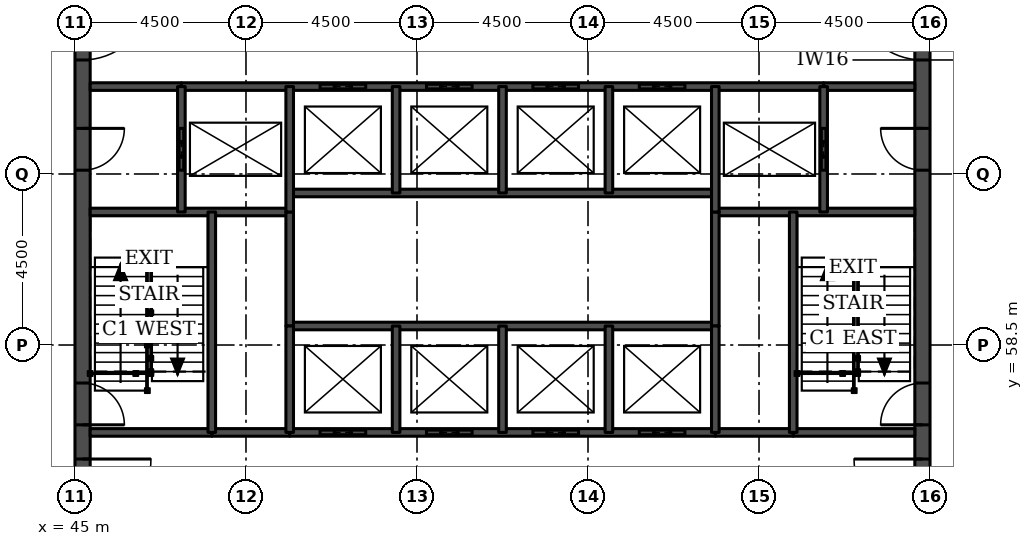
"""IFC4 building model, lengths in metres.
Left out: names, types, materials, properties, quantities, classifications, styles, units other than length and angle.
Written with IfcOpenShell. Run it as: python <this file> out.ifc"""

import sys

from ifc_helpers import new_model, si_unit, direction, frame, frame_2d, origin, place, context, subcontext, project, spatial, rectangle, extrude, element, fill, save


model = new_model("IFC4")
c1 = context("Model", 3, precision=1e-05, world=origin(), true_north=direction((0.0, 1.0)))
c2 = subcontext(c1, "Body", "Model", "MODEL_VIEW")
j1 = project(units=[si_unit("LENGTHUNIT", "METRE"), si_unit("PLANEANGLEUNIT", "RADIAN")], contexts=[c1])
p1 = place(None, origin())
s1 = spatial("IfcSite", under=j1, at=p1, CompositionType="ELEMENT")
p2 = place(p1, origin())
s2 = spatial("IfcBuilding", under=s1, at=p2, CompositionType="ELEMENT")
p3 = place(p2, frame((0.0, 0.0, 188.4)))
s3 = spatial("IfcBuildingStorey", under=s2, at=p3, CompositionType="ELEMENT", Elevation=188.4)
p4 = place(p3, frame((45.2, 49.5, 0.0), z_axis=(0.0, 0.0, 1.0), x_axis=(0.0, 1.0, 0.0)))
e1 = element("IfcWall", 1, at=p4, inside=s3, PredefinedType="SHEAR", context=c2, shape_type="SweptSolid", body=[
    extrude(rectangle(XDim=22.5, YDim=0.4, at=frame_2d((11.25, 0.0))), origin(), (0.0, 0.0, 1.0), 3.7),
])
p5 = place(p4, frame((4.2, 0.0, 0.0)))
e2 = element("IfcOpeningElement", 2, at=p5, cuts=e1, PredefinedType="OPENING", context=c2, shape_type="SweptSolid", body=[
    extrude(rectangle(XDim=1.8, YDim=2.1, at=frame_2d((0.9, 1.05))), frame((0.0, 0.21, 0.0), z_axis=(0.0, -1.0, 0.0), x_axis=(1.0, 0.0, 0.0)), (0.0, 0.0, 1.0), 0.42),
])
p6 = place(p4, frame((6.9, 0.0, 0.0)))
e3 = element("IfcOpeningElement", 3, at=p6, cuts=e1, PredefinedType="OPENING", context=c2, shape_type="SweptSolid", body=[
    extrude(rectangle(XDim=1.1, YDim=2.1, at=frame_2d((0.55, 1.05))), frame((0.0, 0.21, 0.0), z_axis=(0.0, -1.0, 0.0), x_axis=(1.0, 0.0, 0.0)), (0.0, 0.0, 1.0), 0.42),
])
p7 = place(p4, frame((13.6, 0.0, 0.0)))
e4 = element("IfcOpeningElement", 4, at=p7, cuts=e1, PredefinedType="OPENING", context=c2, shape_type="SweptSolid", body=[
    extrude(rectangle(XDim=1.1, YDim=2.1, at=frame_2d((0.55, 1.05))), frame((0.0, 0.21, 0.0), z_axis=(0.0, -1.0, 0.0), x_axis=(1.0, 0.0, 0.0)), (0.0, 0.0, 1.0), 0.42),
])
p8 = place(p4, frame((16.5, 0.0, 0.0)))
e5 = element("IfcOpeningElement", 5, at=p8, cuts=e1, PredefinedType="OPENING", context=c2, shape_type="SweptSolid", body=[
    extrude(rectangle(XDim=1.8, YDim=2.1, at=frame_2d((0.9, 1.05))), frame((0.0, 0.21, 0.0), z_axis=(0.0, -1.0, 0.0), x_axis=(1.0, 0.0, 0.0)), (0.0, 0.0, 1.0), 0.42),
])
p9 = place(p3, frame((67.3, 49.5, 0.0), z_axis=(0.0, 0.0, 1.0), x_axis=(0.0, 1.0, 0.0)))
e6 = element("IfcWall", 6, at=p9, inside=s3, PredefinedType="SHEAR", context=c2, shape_type="SweptSolid", body=[
    extrude(rectangle(XDim=22.5, YDim=0.4, at=frame_2d((11.25, 0.0))), origin(), (0.0, 0.0, 1.0), 3.7),
])
p10 = place(p9, frame((4.2, 0.0, 0.0)))
e7 = element("IfcOpeningElement", 7, at=p10, cuts=e6, PredefinedType="OPENING", context=c2, shape_type="SweptSolid", body=[
    extrude(rectangle(XDim=1.8, YDim=2.1, at=frame_2d((0.9, 1.05))), frame((0.0, 0.21, 0.0), z_axis=(0.0, -1.0, 0.0), x_axis=(1.0, 0.0, 0.0)), (0.0, 0.0, 1.0), 0.42),
])
p11 = place(p9, frame((6.9, 0.0, 0.0)))
e8 = element("IfcOpeningElement", 8, at=p11, cuts=e6, PredefinedType="OPENING", context=c2, shape_type="SweptSolid", body=[
    extrude(rectangle(XDim=1.1, YDim=2.1, at=frame_2d((0.55, 1.05))), frame((0.0, 0.21, 0.0), z_axis=(0.0, -1.0, 0.0), x_axis=(1.0, 0.0, 0.0)), (0.0, 0.0, 1.0), 0.42),
])
p12 = place(p9, frame((13.6, 0.0, 0.0)))
e9 = element("IfcOpeningElement", 9, at=p12, cuts=e6, PredefinedType="OPENING", context=c2, shape_type="SweptSolid", body=[
    extrude(rectangle(XDim=1.1, YDim=2.1, at=frame_2d((0.55, 1.05))), frame((0.0, 0.21, 0.0), z_axis=(0.0, -1.0, 0.0), x_axis=(1.0, 0.0, 0.0)), (0.0, 0.0, 1.0), 0.42),
])
p13 = place(p9, frame((16.5, 0.0, 0.0)))
e10 = element("IfcOpeningElement", 10, at=p13, cuts=e6, PredefinedType="OPENING", context=c2, shape_type="SweptSolid", body=[
    extrude(rectangle(XDim=1.8, YDim=2.1, at=frame_2d((0.9, 1.05))), frame((0.0, 0.21, 0.0), z_axis=(0.0, -1.0, 0.0), x_axis=(1.0, 0.0, 0.0)), (0.0, 0.0, 1.0), 0.42),
])
for number, where, z_axis, x_axis in (
    (11, (48.6, 56.2, 0.0), (0.0, 0.0, 1.0), (1.0, 0.0, 0.0)),
    (12, (61.85, 56.2, 0.0), (0.0, 0.0, 1.0), (1.0, 0.0, 0.0)),
):
    element("IfcWall", number, at=place(p3, frame(where, z_axis=z_axis, x_axis=x_axis)), inside=s3, PredefinedType="SOLIDWALL", context=c2, shape_type="SweptSolid", body=[
        extrude(rectangle(XDim=2.05, YDim=0.2, at=frame_2d((1.025, 0.0))), origin(), (0.0, 0.0, 1.0), 3.55),
    ])
p14 = place(p3, frame((45.4, 56.2, 0.0), z_axis=(0.0, 0.0, 1.0), x_axis=(1.0, 0.0, 0.0)))
e13 = element("IfcWall", 13, at=p14, inside=s3, PredefinedType="SOLIDWALL", context=c2, shape_type="SweptSolid", body=[
    extrude(rectangle(XDim=3.2, YDim=0.2, at=frame_2d((1.6, 0.0))), origin(), (0.0, 0.0, 1.0), 3.55),
])
p15 = place(p3, frame((50.65, 56.2, 0.0), z_axis=(0.0, 0.0, 1.0), x_axis=(1.0, 0.0, 0.0)))
e14 = element("IfcWall", 14, at=p15, inside=s3, PredefinedType="SOLIDWALL", context=c2, shape_type="SweptSolid", body=[
    extrude(rectangle(XDim=11.2, YDim=0.2, at=frame_2d((5.6, 0.0))), origin(), (0.0, 0.0, 1.0), 3.55),
])
p16 = place(p15, frame((0.8, 0.0, 0.0)))
e15 = element("IfcOpeningElement", 15, at=p16, cuts=e14, PredefinedType="OPENING", context=c2, shape_type="SweptSolid", body=[
    extrude(rectangle(XDim=1.2, YDim=2.1, at=frame_2d((0.6, 1.05))), frame((0.0, 0.11, 0.0), z_axis=(0.0, -1.0, 0.0), x_axis=(1.0, 0.0, 0.0)), (0.0, 0.0, 1.0), 0.22),
])
p17 = place(p15, frame((3.6, 0.0, 0.0)))
e16 = element("IfcOpeningElement", 16, at=p17, cuts=e14, PredefinedType="OPENING", context=c2, shape_type="SweptSolid", body=[
    extrude(rectangle(XDim=1.2, YDim=2.1, at=frame_2d((0.6, 1.05))), frame((0.0, 0.11, 0.0), z_axis=(0.0, -1.0, 0.0), x_axis=(1.0, 0.0, 0.0)), (0.0, 0.0, 1.0), 0.22),
])
p18 = place(p15, frame((6.4, 0.0, 0.0)))
e17 = element("IfcOpeningElement", 17, at=p18, cuts=e14, PredefinedType="OPENING", context=c2, shape_type="SweptSolid", body=[
    extrude(rectangle(XDim=1.2, YDim=2.1, at=frame_2d((0.6, 1.05))), frame((0.0, 0.11, 0.0), z_axis=(0.0, -1.0, 0.0), x_axis=(1.0, 0.0, 0.0)), (0.0, 0.0, 1.0), 0.22),
])
p19 = place(p15, frame((9.2, 0.0, 0.0)))
e18 = element("IfcOpeningElement", 18, at=p19, cuts=e14, PredefinedType="OPENING", context=c2, shape_type="SweptSolid", body=[
    extrude(rectangle(XDim=1.2, YDim=2.1, at=frame_2d((0.6, 1.05))), frame((0.0, 0.11, 0.0), z_axis=(0.0, -1.0, 0.0), x_axis=(1.0, 0.0, 0.0)), (0.0, 0.0, 1.0), 0.22),
])
p20 = place(p3, frame((63.9, 56.2, 0.0), z_axis=(0.0, 0.0, 1.0), x_axis=(1.0, 0.0, 0.0)))
e19 = element("IfcWall", 19, at=p20, inside=s3, PredefinedType="SOLIDWALL", context=c2, shape_type="SweptSolid", body=[
    extrude(rectangle(XDim=3.2, YDim=0.2, at=frame_2d((1.6, 0.0))), origin(), (0.0, 0.0, 1.0), 3.55),
])
p21 = place(p3, frame((50.65, 59.0, 0.0), z_axis=(0.0, 0.0, 1.0), x_axis=(1.0, 0.0, 0.0)))
e20 = element("IfcWall", 20, at=p21, inside=s3, PredefinedType="SOLIDWALL", context=c2, shape_type="SweptSolid", body=[
    extrude(rectangle(XDim=11.2, YDim=0.2, at=frame_2d((5.6, 0.0))), origin(), (0.0, 0.0, 1.0), 3.7),
])
for number, where, z_axis, x_axis in (
    (21, (45.4, 62.0, 0.0), (0.0, 0.0, 1.0), (1.0, 0.0, 0.0)),
    (22, (61.85, 62.0, 0.0), (0.0, 0.0, 1.0), (1.0, 0.0, 0.0)),
):
    element("IfcWall", number, at=place(p3, frame(where, z_axis=z_axis, x_axis=x_axis)), inside=s3, PredefinedType="SOLIDWALL", context=c2, shape_type="SweptSolid", body=[
        extrude(rectangle(XDim=5.25, YDim=0.2, at=frame_2d((2.625, 0.0))), origin(), (0.0, 0.0, 1.0), 3.55),
    ])
p22 = place(p3, frame((50.65, 62.5, 0.0), z_axis=(0.0, 0.0, 1.0), x_axis=(1.0, 0.0, 0.0)))
e23 = element("IfcWall", 23, at=p22, inside=s3, PredefinedType="SOLIDWALL", context=c2, shape_type="SweptSolid", body=[
    extrude(rectangle(XDim=11.2, YDim=0.2, at=frame_2d((5.6, 0.0))), origin(), (0.0, 0.0, 1.0), 3.7),
])
for number, where, z_axis, x_axis in (
    (24, (45.4, 65.3, 0.0), (0.0, 0.0, 1.0), (1.0, 0.0, 0.0)),
    (25, (64.7, 65.3, 0.0), (0.0, 0.0, 1.0), (1.0, 0.0, 0.0)),
):
    element("IfcWall", number, at=place(p3, frame(where, z_axis=z_axis, x_axis=x_axis)), inside=s3, PredefinedType="SOLIDWALL", context=c2, shape_type="SweptSolid", body=[
        extrude(rectangle(XDim=2.4, YDim=0.2, at=frame_2d((1.2, 0.0))), origin(), (0.0, 0.0, 1.0), 3.55),
    ])
p23 = place(p3, frame((47.8, 65.3, 0.0), z_axis=(0.0, 0.0, 1.0), x_axis=(1.0, 0.0, 0.0)))
e26 = element("IfcWall", 26, at=p23, inside=s3, PredefinedType="SOLIDWALL", context=c2, shape_type="SweptSolid", body=[
    extrude(rectangle(XDim=16.9, YDim=0.2, at=frame_2d((8.45, 0.0))), origin(), (0.0, 0.0, 1.0), 3.55),
])
p24 = place(p23, frame((3.65, 0.0, 0.0)))
e27 = element("IfcOpeningElement", 27, at=p24, cuts=e26, PredefinedType="OPENING", context=c2, shape_type="SweptSolid", body=[
    extrude(rectangle(XDim=1.2, YDim=2.1, at=frame_2d((0.6, 1.05))), frame((0.0, 0.11, 0.0), z_axis=(0.0, -1.0, 0.0), x_axis=(1.0, 0.0, 0.0)), (0.0, 0.0, 1.0), 0.22),
])
p25 = place(p23, frame((6.45, 0.0, 0.0)))
e28 = element("IfcOpeningElement", 28, at=p25, cuts=e26, PredefinedType="OPENING", context=c2, shape_type="SweptSolid", body=[
    extrude(rectangle(XDim=1.2, YDim=2.1, at=frame_2d((0.6, 1.05))), frame((0.0, 0.11, 0.0), z_axis=(0.0, -1.0, 0.0), x_axis=(1.0, 0.0, 0.0)), (0.0, 0.0, 1.0), 0.22),
])
p26 = place(p23, frame((9.25, 0.0, 0.0)))
e29 = element("IfcOpeningElement", 29, at=p26, cuts=e26, PredefinedType="OPENING", context=c2, shape_type="SweptSolid", body=[
    extrude(rectangle(XDim=1.2, YDim=2.1, at=frame_2d((0.6, 1.05))), frame((0.0, 0.11, 0.0), z_axis=(0.0, -1.0, 0.0), x_axis=(1.0, 0.0, 0.0)), (0.0, 0.0, 1.0), 0.22),
])
p27 = place(p23, frame((12.05, 0.0, 0.0)))
e30 = element("IfcOpeningElement", 30, at=p27, cuts=e26, PredefinedType="OPENING", context=c2, shape_type="SweptSolid", body=[
    extrude(rectangle(XDim=1.2, YDim=2.1, at=frame_2d((0.6, 1.05))), frame((0.0, 0.11, 0.0), z_axis=(0.0, -1.0, 0.0), x_axis=(1.0, 0.0, 0.0)), (0.0, 0.0, 1.0), 0.22),
])
p28 = place(p3, frame((47.8, 62.0, 0.0), z_axis=(0.0, 0.0, 1.0), x_axis=(0.0, 1.0, 0.0)))
e31 = element("IfcWall", 31, at=p28, inside=s3, PredefinedType="SOLIDWALL", context=c2, shape_type="SweptSolid", body=[
    extrude(rectangle(XDim=3.3, YDim=0.2, at=frame_2d((1.65, 0.0))), origin(), (0.0, 0.0, 1.0), 3.55),
])
p29 = place(p28, frame((1.1, 0.0, 0.0)))
e32 = element("IfcOpeningElement", 32, at=p29, cuts=e31, PredefinedType="OPENING", context=c2, shape_type="SweptSolid", body=[
    extrude(rectangle(XDim=1.1, YDim=2.1, at=frame_2d((0.55, 1.05))), frame((0.0, 0.11, 0.0), z_axis=(0.0, -1.0, 0.0), x_axis=(1.0, 0.0, 0.0)), (0.0, 0.0, 1.0), 0.22),
])
p30 = place(p3, frame((48.6, 56.2, 0.0), z_axis=(0.0, 0.0, 1.0), x_axis=(0.0, 1.0, 0.0)))
e33 = element("IfcWall", 33, at=p30, inside=s3, PredefinedType="SOLIDWALL", context=c2, shape_type="SweptSolid", body=[
    extrude(rectangle(XDim=5.8, YDim=0.2, at=frame_2d((2.9, 0.0))), origin(), (0.0, 0.0, 1.0), 3.55),
])
p31 = place(p3, frame((50.65, 59.0, 0.0), z_axis=(0.0, 0.0, 1.0), x_axis=(0.0, 1.0, 0.0)))
e34 = element("IfcWall", 34, at=p31, inside=s3, PredefinedType="SOLIDWALL", context=c2, shape_type="SweptSolid", body=[
    extrude(rectangle(XDim=3.0, YDim=0.2, at=frame_2d((1.5, 0.0))), origin(), (0.0, 0.0, 1.0), 3.7),
])
p32 = place(p3, frame((50.65, 56.2, 0.0), z_axis=(0.0, 0.0, 1.0), x_axis=(0.0, 1.0, 0.0)))
e35 = element("IfcWall", 35, at=p32, inside=s3, PredefinedType="SOLIDWALL", context=c2, shape_type="SweptSolid", body=[
    extrude(rectangle(XDim=2.8, YDim=0.2, at=frame_2d((1.4, 0.0))), origin(), (0.0, 0.0, 1.0), 3.55),
])
p33 = place(p3, frame((50.65, 62.0, 0.0), z_axis=(0.0, 0.0, 1.0), x_axis=(0.0, 1.0, 0.0)))
e36 = element("IfcWall", 36, at=p33, inside=s3, PredefinedType="SOLIDWALL", context=c2, shape_type="SweptSolid", body=[
    extrude(rectangle(XDim=3.3, YDim=0.2, at=frame_2d((1.65, 0.0))), origin(), (0.0, 0.0, 1.0), 3.55),
])
for number, where, z_axis, x_axis in (
    (37, (53.45, 56.2, 0.0), (0.0, 0.0, 1.0), (0.0, 1.0, 0.0)),
    (38, (53.45, 62.5, 0.0), (0.0, 0.0, 1.0), (0.0, 1.0, 0.0)),
    (39, (56.25, 56.2, 0.0), (0.0, 0.0, 1.0), (0.0, 1.0, 0.0)),
    (40, (56.25, 62.5, 0.0), (0.0, 0.0, 1.0), (0.0, 1.0, 0.0)),
    (41, (59.05, 56.2, 0.0), (0.0, 0.0, 1.0), (0.0, 1.0, 0.0)),
    (42, (59.05, 62.5, 0.0), (0.0, 0.0, 1.0), (0.0, 1.0, 0.0)),
):
    element("IfcWall", number, at=place(p3, frame(where, z_axis=z_axis, x_axis=x_axis)), inside=s3, PredefinedType="SOLIDWALL", context=c2, shape_type="SweptSolid", body=[
        extrude(rectangle(XDim=2.8, YDim=0.2, at=frame_2d((1.4, 0.0))), origin(), (0.0, 0.0, 1.0), 3.55),
    ])
p34 = place(p3, frame((61.85, 59.0, 0.0), z_axis=(0.0, 0.0, 1.0), x_axis=(0.0, 1.0, 0.0)))
e43 = element("IfcWall", 43, at=p34, inside=s3, PredefinedType="SOLIDWALL", context=c2, shape_type="SweptSolid", body=[
    extrude(rectangle(XDim=3.0, YDim=0.2, at=frame_2d((1.5, 0.0))), origin(), (0.0, 0.0, 1.0), 3.7),
])
p35 = place(p3, frame((61.85, 56.2, 0.0), z_axis=(0.0, 0.0, 1.0), x_axis=(0.0, 1.0, 0.0)))
e44 = element("IfcWall", 44, at=p35, inside=s3, PredefinedType="SOLIDWALL", context=c2, shape_type="SweptSolid", body=[
    extrude(rectangle(XDim=2.8, YDim=0.2, at=frame_2d((1.4, 0.0))), origin(), (0.0, 0.0, 1.0), 3.55),
])
p36 = place(p3, frame((61.85, 62.0, 0.0), z_axis=(0.0, 0.0, 1.0), x_axis=(0.0, 1.0, 0.0)))
e45 = element("IfcWall", 45, at=p36, inside=s3, PredefinedType="SOLIDWALL", context=c2, shape_type="SweptSolid", body=[
    extrude(rectangle(XDim=3.3, YDim=0.2, at=frame_2d((1.65, 0.0))), origin(), (0.0, 0.0, 1.0), 3.55),
])
p37 = place(p3, frame((63.9, 56.2, 0.0), z_axis=(0.0, 0.0, 1.0), x_axis=(0.0, 1.0, 0.0)))
e46 = element("IfcWall", 46, at=p37, inside=s3, PredefinedType="SOLIDWALL", context=c2, shape_type="SweptSolid", body=[
    extrude(rectangle(XDim=5.8, YDim=0.2, at=frame_2d((2.9, 0.0))), origin(), (0.0, 0.0, 1.0), 3.55),
])
p38 = place(p3, frame((64.7, 62.0, 0.0), z_axis=(0.0, 0.0, 1.0), x_axis=(0.0, 1.0, 0.0)))
e47 = element("IfcWall", 47, at=p38, inside=s3, PredefinedType="SOLIDWALL", context=c2, shape_type="SweptSolid", body=[
    extrude(rectangle(XDim=3.3, YDim=0.2, at=frame_2d((1.65, 0.0))), origin(), (0.0, 0.0, 1.0), 3.55),
])
p39 = place(p38, frame((1.1, 0.0, 0.0)))
e48 = element("IfcOpeningElement", 48, at=p39, cuts=e47, PredefinedType="OPENING", context=c2, shape_type="SweptSolid", body=[
    extrude(rectangle(XDim=1.1, YDim=2.1, at=frame_2d((0.55, 1.05))), frame((0.0, 0.11, 0.0), z_axis=(0.0, -1.0, 0.0), x_axis=(1.0, 0.0, 0.0)), (0.0, 0.0, 1.0), 0.22),
])
p40 = place(p16, origin())
e49 = element("IfcDoor", 49, at=p40, inside=s3, OperationType="DOUBLE_DOOR_SLIDING", PredefinedType="DOOR", context=c2, shape_type="SweptSolid", body=[
    extrude(rectangle(XDim=1.2, YDim=2.1, at=frame_2d((0.6, 1.05))), frame((0.0, 0.025, 0.0), z_axis=(0.0, -1.0, 0.0), x_axis=(1.0, 0.0, 0.0)), (0.0, 0.0, 1.0), 0.05),
])
fill(e15, e49)
p41 = place(p17, origin())
e50 = element("IfcDoor", 50, at=p41, inside=s3, OperationType="DOUBLE_DOOR_SLIDING", PredefinedType="DOOR", context=c2, shape_type="SweptSolid", body=[
    extrude(rectangle(XDim=1.2, YDim=2.1, at=frame_2d((0.6, 1.05))), frame((0.0, 0.025, 0.0), z_axis=(0.0, -1.0, 0.0), x_axis=(1.0, 0.0, 0.0)), (0.0, 0.0, 1.0), 0.05),
])
fill(e16, e50)
p42 = place(p18, origin())
e51 = element("IfcDoor", 51, at=p42, inside=s3, OperationType="DOUBLE_DOOR_SLIDING", PredefinedType="DOOR", context=c2, shape_type="SweptSolid", body=[
    extrude(rectangle(XDim=1.2, YDim=2.1, at=frame_2d((0.6, 1.05))), frame((0.0, 0.025, 0.0), z_axis=(0.0, -1.0, 0.0), x_axis=(1.0, 0.0, 0.0)), (0.0, 0.0, 1.0), 0.05),
])
fill(e17, e51)
p43 = place(p19, origin())
e52 = element("IfcDoor", 52, at=p43, inside=s3, OperationType="DOUBLE_DOOR_SLIDING", PredefinedType="DOOR", context=c2, shape_type="SweptSolid", body=[
    extrude(rectangle(XDim=1.2, YDim=2.1, at=frame_2d((0.6, 1.05))), frame((0.0, 0.025, 0.0), z_axis=(0.0, -1.0, 0.0), x_axis=(1.0, 0.0, 0.0)), (0.0, 0.0, 1.0), 0.05),
])
fill(e18, e52)
p44 = place(p24, origin())
e53 = element("IfcDoor", 53, at=p44, inside=s3, OperationType="DOUBLE_DOOR_SLIDING", PredefinedType="DOOR", context=c2, shape_type="SweptSolid", body=[
    extrude(rectangle(XDim=1.2, YDim=2.1, at=frame_2d((0.6, 1.05))), frame((0.0, 0.025, 0.0), z_axis=(0.0, -1.0, 0.0), x_axis=(1.0, 0.0, 0.0)), (0.0, 0.0, 1.0), 0.05),
])
fill(e27, e53)
p45 = place(p25, origin())
e54 = element("IfcDoor", 54, at=p45, inside=s3, OperationType="DOUBLE_DOOR_SLIDING", PredefinedType="DOOR", context=c2, shape_type="SweptSolid", body=[
    extrude(rectangle(XDim=1.2, YDim=2.1, at=frame_2d((0.6, 1.05))), frame((0.0, 0.025, 0.0), z_axis=(0.0, -1.0, 0.0), x_axis=(1.0, 0.0, 0.0)), (0.0, 0.0, 1.0), 0.05),
])
fill(e28, e54)
p46 = place(p26, origin())
e55 = element("IfcDoor", 55, at=p46, inside=s3, OperationType="DOUBLE_DOOR_SLIDING", PredefinedType="DOOR", context=c2, shape_type="SweptSolid", body=[
    extrude(rectangle(XDim=1.2, YDim=2.1, at=frame_2d((0.6, 1.05))), frame((0.0, 0.025, 0.0), z_axis=(0.0, -1.0, 0.0), x_axis=(1.0, 0.0, 0.0)), (0.0, 0.0, 1.0), 0.05),
])
fill(e29, e55)
p47 = place(p27, origin())
e56 = element("IfcDoor", 56, at=p47, inside=s3, OperationType="DOUBLE_DOOR_SLIDING", PredefinedType="DOOR", context=c2, shape_type="SweptSolid", body=[
    extrude(rectangle(XDim=1.2, YDim=2.1, at=frame_2d((0.6, 1.05))), frame((0.0, 0.025, 0.0), z_axis=(0.0, -1.0, 0.0), x_axis=(1.0, 0.0, 0.0)), (0.0, 0.0, 1.0), 0.05),
])
fill(e30, e56)
p48 = place(p29, origin())
e57 = element("IfcDoor", 57, at=p48, inside=s3, OperationType="DOUBLE_DOOR_SLIDING", PredefinedType="DOOR", context=c2, shape_type="SweptSolid", body=[
    extrude(rectangle(XDim=1.1, YDim=2.1, at=frame_2d((0.55, 1.05))), frame((0.0, 0.025, 0.0), z_axis=(0.0, -1.0, 0.0), x_axis=(1.0, 0.0, 0.0)), (0.0, 0.0, 1.0), 0.05),
])
fill(e32, e57)
p49 = place(p39, origin())
e58 = element("IfcDoor", 58, at=p49, inside=s3, OperationType="DOUBLE_DOOR_SLIDING", PredefinedType="DOOR", context=c2, shape_type="SweptSolid", body=[
    extrude(rectangle(XDim=1.1, YDim=2.1, at=frame_2d((0.55, 1.05))), frame((0.0, 0.025, 0.0), z_axis=(0.0, -1.0, 0.0), x_axis=(1.0, 0.0, 0.0)), (0.0, 0.0, 1.0), 0.05),
])
fill(e48, e58)
p50 = place(p5, frame((1.8, 0.0, 0.0), z_axis=(0.0, 0.0, 1.0), x_axis=(-1.0, 0.0, 0.0)))
e59 = element("IfcDoor", 59, at=p50, inside=s3, OperationType="SINGLE_SWING_LEFT", PredefinedType="DOOR", context=c2, shape_type="SweptSolid", body=[
    extrude(rectangle(XDim=1.8, YDim=2.1, at=frame_2d((0.9, 1.05))), frame((0.0, 0.025, 0.0), z_axis=(0.0, -1.0, 0.0), x_axis=(1.0, 0.0, 0.0)), (0.0, 0.0, 1.0), 0.05),
])
fill(e2, e59)
p51 = place(p6, frame((1.1, 0.0, 0.0), z_axis=(0.0, 0.0, 1.0), x_axis=(-1.0, 0.0, 0.0)))
e60 = element("IfcDoor", 60, at=p51, inside=s3, OperationType="SINGLE_SWING_RIGHT", PredefinedType="DOOR", context=c2, shape_type="SweptSolid", body=[
    extrude(rectangle(XDim=1.1, YDim=2.1, at=frame_2d((0.55, 1.05))), frame((0.0, 0.025, 0.0), z_axis=(0.0, -1.0, 0.0), x_axis=(1.0, 0.0, 0.0)), (0.0, 0.0, 1.0), 0.05),
])
fill(e3, e60)
p52 = place(p7, frame((1.1, 0.0, 0.0), z_axis=(0.0, 0.0, 1.0), x_axis=(-1.0, 0.0, 0.0)))
e61 = element("IfcDoor", 61, at=p52, inside=s3, OperationType="SINGLE_SWING_LEFT", PredefinedType="DOOR", context=c2, shape_type="SweptSolid", body=[
    extrude(rectangle(XDim=1.1, YDim=2.1, at=frame_2d((0.55, 1.05))), frame((0.0, 0.025, 0.0), z_axis=(0.0, -1.0, 0.0), x_axis=(1.0, 0.0, 0.0)), (0.0, 0.0, 1.0), 0.05),
])
fill(e4, e61)
p53 = place(p8, frame((1.8, 0.0, 0.0), z_axis=(0.0, 0.0, 1.0), x_axis=(-1.0, 0.0, 0.0)))
e62 = element("IfcDoor", 62, at=p53, inside=s3, OperationType="SINGLE_SWING_LEFT", PredefinedType="DOOR", context=c2, shape_type="SweptSolid", body=[
    extrude(rectangle(XDim=1.8, YDim=2.1, at=frame_2d((0.9, 1.05))), frame((0.0, 0.025, 0.0), z_axis=(0.0, -1.0, 0.0), x_axis=(1.0, 0.0, 0.0)), (0.0, 0.0, 1.0), 0.05),
])
fill(e5, e62)
p54 = place(p10, origin())
e63 = element("IfcDoor", 63, at=p54, inside=s3, OperationType="SINGLE_SWING_RIGHT", PredefinedType="DOOR", context=c2, shape_type="SweptSolid", body=[
    extrude(rectangle(XDim=1.8, YDim=2.1, at=frame_2d((0.9, 1.05))), frame((0.0, 0.025, 0.0), z_axis=(0.0, -1.0, 0.0), x_axis=(1.0, 0.0, 0.0)), (0.0, 0.0, 1.0), 0.05),
])
fill(e7, e63)
p55 = place(p11, origin())
e64 = element("IfcDoor", 64, at=p55, inside=s3, OperationType="SINGLE_SWING_LEFT", PredefinedType="DOOR", context=c2, shape_type="SweptSolid", body=[
    extrude(rectangle(XDim=1.1, YDim=2.1, at=frame_2d((0.55, 1.05))), frame((0.0, 0.025, 0.0), z_axis=(0.0, -1.0, 0.0), x_axis=(1.0, 0.0, 0.0)), (0.0, 0.0, 1.0), 0.05),
])
fill(e8, e64)
p56 = place(p12, origin())
e65 = element("IfcDoor", 65, at=p56, inside=s3, OperationType="SINGLE_SWING_RIGHT", PredefinedType="DOOR", context=c2, shape_type="SweptSolid", body=[
    extrude(rectangle(XDim=1.1, YDim=2.1, at=frame_2d((0.55, 1.05))), frame((0.0, 0.025, 0.0), z_axis=(0.0, -1.0, 0.0), x_axis=(1.0, 0.0, 0.0)), (0.0, 0.0, 1.0), 0.05),
])
fill(e9, e65)
p57 = place(p13, origin())
e66 = element("IfcDoor", 66, at=p57, inside=s3, OperationType="SINGLE_SWING_RIGHT", PredefinedType="DOOR", context=c2, shape_type="SweptSolid", body=[
    extrude(rectangle(XDim=1.8, YDim=2.1, at=frame_2d((0.9, 1.05))), frame((0.0, 0.025, 0.0), z_axis=(0.0, -1.0, 0.0), x_axis=(1.0, 0.0, 0.0)), (0.0, 0.0, 1.0), 0.05),
])
fill(e10, e66)
save(model, sys.argv[1])
